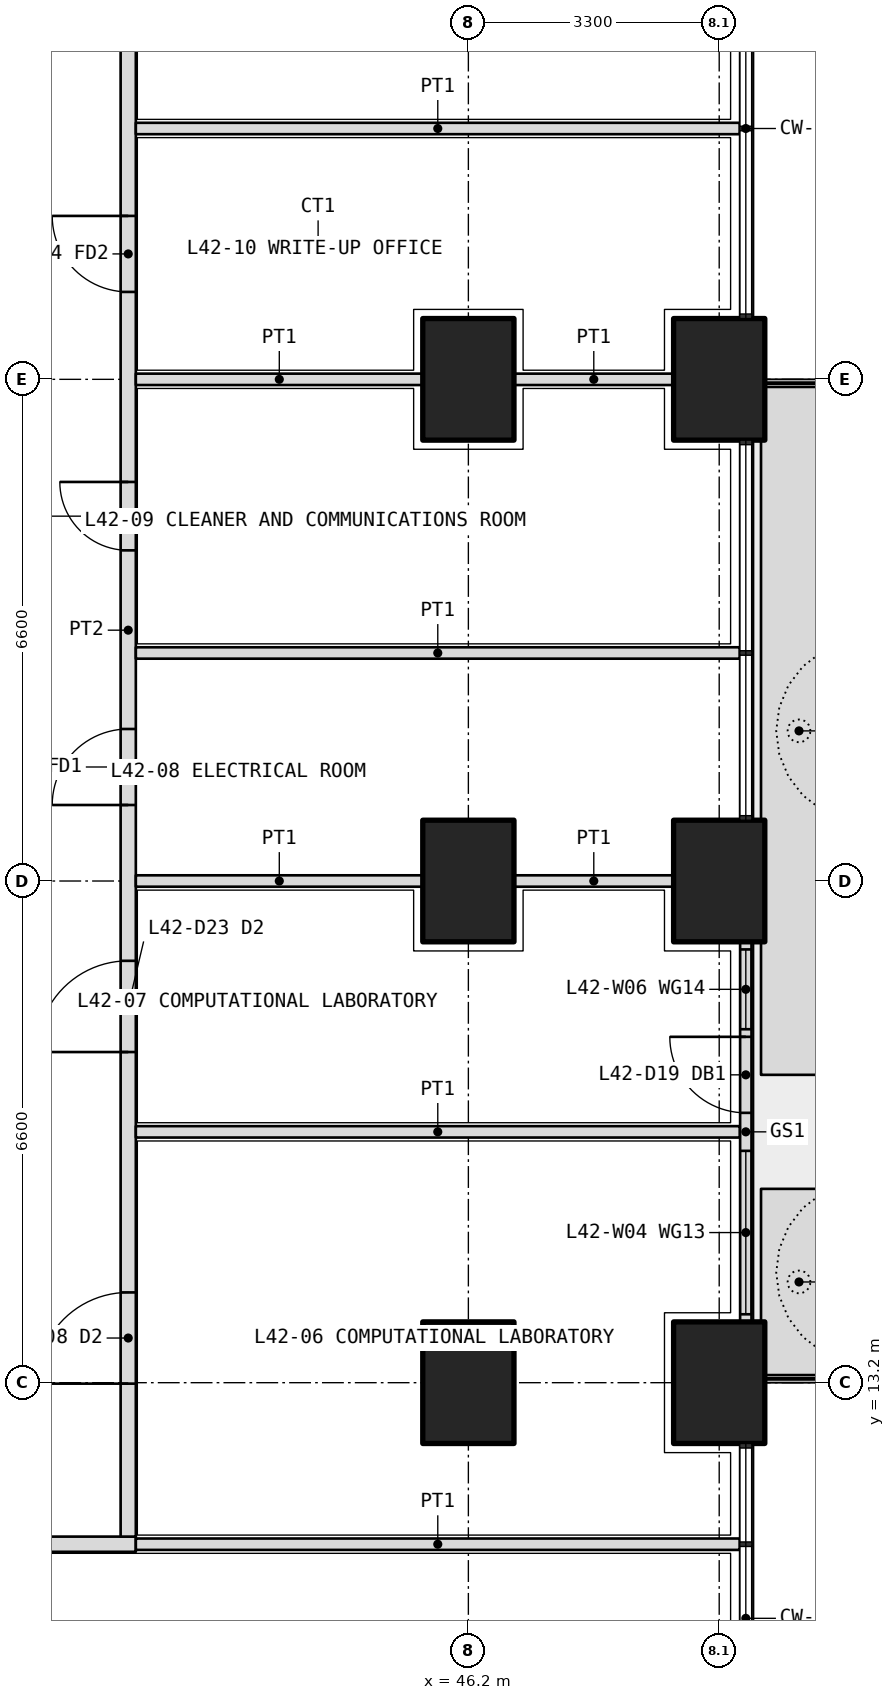
"""IFC4 building model, lengths in metres.
Left out: names, types, materials, properties, quantities, classifications, styles, units other than length and angle.
Written with IfcOpenShell. Run it as: python <this file> out.ifc"""

import sys

from ifc_helpers import new_model, si_unit, direction, frame, frame_2d, origin, origin_2d, place, context, subcontext, project, spatial, polyline, rectangle, outline, extrude, element, fill, save


model = new_model("IFC4")
c1 = context("Model", 3, precision=1e-05, world=origin(), true_north=direction((0.0, 1.0)))
c2 = subcontext(c1, "Body", "Model", "MODEL_VIEW")
j1 = project(units=[si_unit("LENGTHUNIT", "METRE"), si_unit("PLANEANGLEUNIT", "RADIAN")], contexts=[c1])
p1 = place(None, origin())
s1 = spatial("IfcSite", under=j1, at=p1, CompositionType="ELEMENT")
p2 = place(p1, origin())
s2 = spatial("IfcBuilding", under=s1, at=p2, CompositionType="ELEMENT")
p3 = place(p2, frame((0.0, 0.0, 185.1)))
s3 = spatial("IfcBuildingStorey", under=s2, at=p3, CompositionType="ELEMENT", Elevation=185.1)
for number, where, z_axis, x_axis in (
    (1, (49.5, 13.2, 0.0), (0.0, 0.0, 1.0), (0.0, 1.0, 0.0)),
    (2, (49.5, 19.8, 0.0), (0.0, 0.0, 1.0), (0.0, 1.0, 0.0)),
    (3, (49.5, 26.4, 0.0), (0.0, 0.0, 1.0), (0.0, 1.0, 0.0)),
    (4, (46.2, 13.2, 0.0), (0.0, 0.0, 1.0), (0.0, 1.0, 0.0)),
    (5, (46.2, 19.8, 0.0), (0.0, 0.0, 1.0), (0.0, 1.0, 0.0)),
    (6, (46.2, 26.4, 0.0), (0.0, 0.0, 1.0), (0.0, 1.0, 0.0)),
):
    element("IfcColumn", number, at=place(p3, frame(where, z_axis=z_axis, x_axis=x_axis)), inside=s3, PredefinedType="COLUMN", context=c2, shape_type="SweptSolid", body=[
        extrude(rectangle(XDim=1.6, YDim=1.2, at=origin_2d()), origin(), (0.0, 0.0, 1.0), 4.2),
    ])
p4 = place(p3, origin())
e7 = element("IfcWall", 7, at=p4, inside=s3, PredefinedType="USERDEFINED", context=c2, shape_type="SweptSolid", body=[
    extrude(outline(polyline([(50.05, 13.3), (51.05, 13.3), (51.05, 15.75), (50.05, 15.75), (50.05, 13.3)]), holes=[polyline([(50.2, 13.45), (50.9, 13.45), (50.9, 15.6), (50.2, 15.6), (50.2, 13.45)])]), origin(), (0.0, 0.0, 1.0), 1.05),
])
p5 = place(p3, origin())
e8 = element("IfcWall", 8, at=p5, inside=s3, PredefinedType="USERDEFINED", context=c2, shape_type="SweptSolid", body=[
    extrude(outline(polyline([(50.05, 17.25), (51.05, 17.25), (51.05, 26.3), (50.05, 26.3), (50.05, 17.25)]), holes=[polyline([(50.2, 17.4), (50.9, 17.4), (50.9, 26.15), (50.2, 26.15), (50.2, 17.4)])]), origin(), (0.0, 0.0, 1.0), 1.05),
])
p6 = place(p3, frame((49.85, 14.0, 0.0), z_axis=(0.0, 0.0, 1.0), x_axis=(0.0, 1.0, 0.0)))
e9 = element("IfcWall", 9, at=p6, inside=s3, PredefinedType="SOLIDWALL", context=c2, shape_type="SweptSolid", body=[
    extrude(rectangle(XDim=5.0, YDim=0.15, at=frame_2d((2.5, 0.0))), origin(), (0.0, 0.0, 1.0), 2.7),
])
p7 = place(p6, frame((2.75, 0.0, 0.0)))
e10 = element("IfcOpeningElement", 10, at=p7, cuts=e9, PredefinedType="OPENING", context=c2, shape_type="SweptSolid", body=[
    extrude(rectangle(XDim=1.0, YDim=2.4, at=frame_2d((0.5, 1.2))), frame((0.0, 0.085, 0.0), z_axis=(0.0, -1.0, 0.0), x_axis=(1.0, 0.0, 0.0)), (0.0, 0.0, 1.0), 0.17),
])
p8 = place(p6, frame((0.1, 0.0, 0.1)))
e11 = element("IfcOpeningElement", 11, at=p8, cuts=e9, PredefinedType="OPENING", context=c2, shape_type="SweptSolid", body=[
    extrude(rectangle(XDim=2.15, YDim=2.3, at=frame_2d((1.075, 1.15))), frame((0.0, 0.085, 0.0), z_axis=(0.0, -1.0, 0.0), x_axis=(1.0, 0.0, 0.0)), (0.0, 0.0, 1.0), 0.17),
])
p9 = place(p6, frame((3.85, 0.0, 0.1)))
e12 = element("IfcOpeningElement", 12, at=p9, cuts=e9, PredefinedType="OPENING", context=c2, shape_type="SweptSolid", body=[
    extrude(rectangle(XDim=1.05, YDim=2.3, at=frame_2d((0.525, 1.15))), frame((0.0, 0.085, 0.0), z_axis=(0.0, -1.0, 0.0), x_axis=(1.0, 0.0, 0.0)), (0.0, 0.0, 1.0), 0.17),
])
p10 = place(p3, frame((10.975, 11.075, 0.0), z_axis=(0.0, 0.0, 1.0), x_axis=(1.0, 0.0, 0.0)))
e13 = element("IfcWall", 13, at=p10, inside=s3, PredefinedType="PARTITIONING", context=c2, shape_type="SweptSolid", body=[
    extrude(rectangle(XDim=30.85, YDim=0.2, at=frame_2d((15.425, 0.0))), origin(), (0.0, 0.0, 1.0), 2.85),
])
p11 = place(p10, frame((3.863, 0.0, 0.0)))
e14 = element("IfcOpeningElement", 14, at=p11, cuts=e13, PredefinedType="OPENING", context=c2, shape_type="SweptSolid", body=[
    extrude(rectangle(XDim=1.2, YDim=2.1, at=frame_2d((0.6, 1.05))), frame((0.0, 0.11, 0.0), z_axis=(0.0, -1.0, 0.0), x_axis=(1.0, 0.0, 0.0)), (0.0, 0.0, 1.0), 0.22),
])
p12 = place(p10, frame((11.525, 0.0, 0.0)))
e15 = element("IfcOpeningElement", 15, at=p12, cuts=e13, PredefinedType="OPENING", context=c2, shape_type="SweptSolid", body=[
    extrude(rectangle(XDim=1.2, YDim=2.1, at=frame_2d((0.6, 1.05))), frame((0.0, 0.11, 0.0), z_axis=(0.0, -1.0, 0.0), x_axis=(1.0, 0.0, 0.0)), (0.0, 0.0, 1.0), 0.22),
])
p13 = place(p10, frame((18.125, 0.0, 0.0)))
e16 = element("IfcOpeningElement", 16, at=p13, cuts=e13, PredefinedType="OPENING", context=c2, shape_type="SweptSolid", body=[
    extrude(rectangle(XDim=1.2, YDim=2.1, at=frame_2d((0.6, 1.05))), frame((0.0, 0.11, 0.0), z_axis=(0.0, -1.0, 0.0), x_axis=(1.0, 0.0, 0.0)), (0.0, 0.0, 1.0), 0.22),
])
p14 = place(p10, frame((23.075, 0.0, 0.0)))
e17 = element("IfcOpeningElement", 17, at=p14, cuts=e13, PredefinedType="OPENING", context=c2, shape_type="SweptSolid", body=[
    extrude(rectangle(XDim=1.2, YDim=2.1, at=frame_2d((0.6, 1.05))), frame((0.0, 0.11, 0.0), z_axis=(0.0, -1.0, 0.0), x_axis=(1.0, 0.0, 0.0)), (0.0, 0.0, 1.0), 0.22),
])
p15 = place(p10, frame((27.438, 0.0, 0.0)))
e18 = element("IfcOpeningElement", 18, at=p15, cuts=e13, PredefinedType="OPENING", context=c2, shape_type="SweptSolid", body=[
    extrude(rectangle(XDim=1.2, YDim=2.1, at=frame_2d((0.6, 1.05))), frame((0.0, 0.11, 0.0), z_axis=(0.0, -1.0, 0.0), x_axis=(1.0, 0.0, 0.0)), (0.0, 0.0, 1.0), 0.22),
])
p16 = place(p3, frame((41.725, 11.175, 0.0), z_axis=(0.0, 0.0, 1.0), x_axis=(0.0, 1.0, 0.0)))
e19 = element("IfcWall", 19, at=p16, inside=s3, PredefinedType="PARTITIONING", context=c2, shape_type="SweptSolid", body=[
    extrude(rectangle(XDim=23.85, YDim=0.2, at=frame_2d((11.925, 0.0))), origin(), (0.0, 0.0, 1.0), 2.85),
])
p17 = place(p16, frame((2.012, 0.0, 0.0)))
e20 = element("IfcOpeningElement", 20, at=p17, cuts=e19, PredefinedType="OPENING", context=c2, shape_type="SweptSolid", body=[
    extrude(rectangle(XDim=1.2, YDim=2.1, at=frame_2d((0.6, 1.05))), frame((0.0, 0.11, 0.0), z_axis=(0.0, -1.0, 0.0), x_axis=(1.0, 0.0, 0.0)), (0.0, 0.0, 1.0), 0.22),
])
p18 = place(p16, frame((6.375, 0.0, 0.0)))
e21 = element("IfcOpeningElement", 21, at=p18, cuts=e19, PredefinedType="OPENING", context=c2, shape_type="SweptSolid", body=[
    extrude(rectangle(XDim=1.2, YDim=2.1, at=frame_2d((0.6, 1.05))), frame((0.0, 0.11, 0.0), z_axis=(0.0, -1.0, 0.0), x_axis=(1.0, 0.0, 0.0)), (0.0, 0.0, 1.0), 0.22),
])
p19 = place(p16, frame((9.625, 0.0, 0.0)))
e22 = element("IfcOpeningElement", 22, at=p19, cuts=e19, PredefinedType="OPENING", context=c2, shape_type="SweptSolid", body=[
    extrude(rectangle(XDim=1.0, YDim=2.1, at=frame_2d((0.5, 1.05))), frame((0.0, 0.11, 0.0), z_axis=(0.0, -1.0, 0.0), x_axis=(1.0, 0.0, 0.0)), (0.0, 0.0, 1.0), 0.22),
])
p20 = place(p16, frame((12.975, 0.0, 0.0)))
e23 = element("IfcOpeningElement", 23, at=p20, cuts=e19, PredefinedType="OPENING", context=c2, shape_type="SweptSolid", body=[
    extrude(rectangle(XDim=0.9, YDim=2.1, at=frame_2d((0.45, 1.05))), frame((0.0, 0.11, 0.0), z_axis=(0.0, -1.0, 0.0), x_axis=(1.0, 0.0, 0.0)), (0.0, 0.0, 1.0), 0.22),
])
p21 = place(p16, frame((16.375, 0.0, 0.0)))
e24 = element("IfcOpeningElement", 24, at=p21, cuts=e19, PredefinedType="OPENING", context=c2, shape_type="SweptSolid", body=[
    extrude(rectangle(XDim=1.0, YDim=2.1, at=frame_2d((0.5, 1.05))), frame((0.0, 0.11, 0.0), z_axis=(0.0, -1.0, 0.0), x_axis=(1.0, 0.0, 0.0)), (0.0, 0.0, 1.0), 0.22),
])
p22 = place(p16, frame((20.637, 0.0, 0.0)))
e25 = element("IfcOpeningElement", 25, at=p22, cuts=e19, PredefinedType="OPENING", context=c2, shape_type="SweptSolid", body=[
    extrude(rectangle(XDim=1.2, YDim=2.1, at=frame_2d((0.6, 1.05))), frame((0.0, 0.11, 0.0), z_axis=(0.0, -1.0, 0.0), x_axis=(1.0, 0.0, 0.0)), (0.0, 0.0, 1.0), 0.22),
])
for number, where, z_axis, x_axis in (
    (26, (49.77, 11.075, 0.0), (0.0, 0.0, 1.0), (-1.0, 0.0, 0.0)),
    (27, (49.77, 22.8, 0.0), (0.0, 0.0, 1.0), (-1.0, 0.0, 0.0)),
):
    element("IfcWall", number, at=place(p3, frame(where, z_axis=z_axis, x_axis=x_axis)), inside=s3, PredefinedType="PARTITIONING", context=c2, shape_type="SweptSolid", body=[
        extrude(rectangle(XDim=7.945, YDim=0.15, at=frame_2d((3.973, 0.0))), origin(), (0.0, 0.0, 1.0), 2.7),
    ])
p23 = place(p3, frame((48.9, 26.4, 0.0), z_axis=(0.0, 0.0, 1.0), x_axis=(-1.0, 0.0, 0.0)))
e28 = element("IfcWall", 28, at=p23, inside=s3, PredefinedType="PARTITIONING", context=c2, shape_type="SweptSolid", body=[
    extrude(rectangle(XDim=2.1, YDim=0.15, at=frame_2d((1.05, 0.0))), origin(), (0.0, 0.0, 1.0), 2.85),
])
p24 = place(p3, frame((45.6, 26.4, 0.0), z_axis=(0.0, 0.0, 1.0), x_axis=(-1.0, 0.0, 0.0)))
e29 = element("IfcWall", 29, at=p24, inside=s3, PredefinedType="PARTITIONING", context=c2, shape_type="SweptSolid", body=[
    extrude(rectangle(XDim=3.775, YDim=0.15, at=frame_2d((1.888, 0.0))), origin(), (0.0, 0.0, 1.0), 2.85),
])
p25 = place(p3, frame((49.77, 16.5, 0.0), z_axis=(0.0, 0.0, 1.0), x_axis=(-1.0, 0.0, 0.0)))
e30 = element("IfcWall", 30, at=p25, inside=s3, PredefinedType="PARTITIONING", context=c2, shape_type="SweptSolid", body=[
    extrude(rectangle(XDim=7.945, YDim=0.15, at=frame_2d((3.973, 0.0))), origin(), (0.0, 0.0, 1.0), 2.7),
])
p26 = place(p3, frame((48.9, 19.8, 0.0), z_axis=(0.0, 0.0, 1.0), x_axis=(-1.0, 0.0, 0.0)))
e31 = element("IfcWall", 31, at=p26, inside=s3, PredefinedType="PARTITIONING", context=c2, shape_type="SweptSolid", body=[
    extrude(rectangle(XDim=2.1, YDim=0.15, at=frame_2d((1.05, 0.0))), origin(), (0.0, 0.0, 1.0), 2.85),
])
p27 = place(p3, frame((45.6, 19.8, 0.0), z_axis=(0.0, 0.0, 1.0), x_axis=(-1.0, 0.0, 0.0)))
e32 = element("IfcWall", 32, at=p27, inside=s3, PredefinedType="PARTITIONING", context=c2, shape_type="SweptSolid", body=[
    extrude(rectangle(XDim=3.775, YDim=0.15, at=frame_2d((1.888, 0.0))), origin(), (0.0, 0.0, 1.0), 2.85),
])
p28 = place(p3, frame((49.77, 29.7, 0.0), z_axis=(0.0, 0.0, 1.0), x_axis=(-1.0, 0.0, 0.0)))
e33 = element("IfcWall", 33, at=p28, inside=s3, PredefinedType="PARTITIONING", context=c2, shape_type="SweptSolid", body=[
    extrude(rectangle(XDim=7.945, YDim=0.15, at=frame_2d((3.973, 0.0))), origin(), (0.0, 0.0, 1.0), 2.7),
])
p29 = place(p7, origin())
e34 = element("IfcDoor", 34, at=p29, inside=s3, OperationType="SINGLE_SWING_RIGHT", PredefinedType="DOOR", context=c2, shape_type="SweptSolid", body=[
    extrude(rectangle(XDim=1.0, YDim=2.4, at=frame_2d((0.5, 1.2))), frame((0.0, 0.025, 0.0), z_axis=(0.0, -1.0, 0.0), x_axis=(1.0, 0.0, 0.0)), (0.0, 0.0, 1.0), 0.05),
])
fill(e10, e34)
p30 = place(p8, origin())
e35 = element("IfcWindow", 35, at=p30, inside=s3, PartitioningType="SINGLE_PANEL", PredefinedType="WINDOW", context=c2, shape_type="SweptSolid", body=[
    extrude(rectangle(XDim=2.15, YDim=2.3, at=frame_2d((1.075, 1.15))), frame((0.0, 0.03, 0.0), z_axis=(0.0, -1.0, 0.0), x_axis=(1.0, 0.0, 0.0)), (0.0, 0.0, 1.0), 0.06),
])
fill(e11, e35)
p31 = place(p9, origin())
e36 = element("IfcWindow", 36, at=p31, inside=s3, PartitioningType="SINGLE_PANEL", PredefinedType="WINDOW", context=c2, shape_type="SweptSolid", body=[
    extrude(rectangle(XDim=1.05, YDim=2.3, at=frame_2d((0.525, 1.15))), frame((0.0, 0.03, 0.0), z_axis=(0.0, -1.0, 0.0), x_axis=(1.0, 0.0, 0.0)), (0.0, 0.0, 1.0), 0.06),
])
fill(e12, e36)
p32 = place(p17, origin())
e37 = element("IfcDoor", 37, at=p32, inside=s3, OperationType="DOUBLE_DOOR_SINGLE_SWING", PredefinedType="DOOR", context=c2, shape_type="SweptSolid", body=[
    extrude(rectangle(XDim=1.2, YDim=2.1, at=frame_2d((0.6, 1.05))), frame((0.0, 0.025, 0.0), z_axis=(0.0, -1.0, 0.0), x_axis=(1.0, 0.0, 0.0)), (0.0, 0.0, 1.0), 0.05),
])
fill(e20, e37)
p33 = place(p18, origin())
e38 = element("IfcDoor", 38, at=p33, inside=s3, OperationType="DOUBLE_DOOR_SINGLE_SWING", PredefinedType="DOOR", context=c2, shape_type="SweptSolid", body=[
    extrude(rectangle(XDim=1.2, YDim=2.1, at=frame_2d((0.6, 1.05))), frame((0.0, 0.025, 0.0), z_axis=(0.0, -1.0, 0.0), x_axis=(1.0, 0.0, 0.0)), (0.0, 0.0, 1.0), 0.05),
])
fill(e21, e38)
p34 = place(p19, origin())
e39 = element("IfcDoor", 39, at=p34, inside=s3, OperationType="SINGLE_SWING_LEFT", PredefinedType="DOOR", context=c2, shape_type="SweptSolid", body=[
    extrude(rectangle(XDim=1.0, YDim=2.1, at=frame_2d((0.5, 1.05))), frame((0.0, 0.025, 0.0), z_axis=(0.0, -1.0, 0.0), x_axis=(1.0, 0.0, 0.0)), (0.0, 0.0, 1.0), 0.05),
])
fill(e22, e39)
p35 = place(p20, origin())
e40 = element("IfcDoor", 40, at=p35, inside=s3, OperationType="SINGLE_SWING_RIGHT", PredefinedType="DOOR", context=c2, shape_type="SweptSolid", body=[
    extrude(rectangle(XDim=0.9, YDim=2.1, at=frame_2d((0.45, 1.05))), frame((0.0, 0.025, 0.0), z_axis=(0.0, -1.0, 0.0), x_axis=(1.0, 0.0, 0.0)), (0.0, 0.0, 1.0), 0.05),
])
fill(e23, e40)
p36 = place(p21, origin())
e41 = element("IfcDoor", 41, at=p36, inside=s3, OperationType="SINGLE_SWING_RIGHT", PredefinedType="DOOR", context=c2, shape_type="SweptSolid", body=[
    extrude(rectangle(XDim=1.0, YDim=2.1, at=frame_2d((0.5, 1.05))), frame((0.0, 0.025, 0.0), z_axis=(0.0, -1.0, 0.0), x_axis=(1.0, 0.0, 0.0)), (0.0, 0.0, 1.0), 0.05),
])
fill(e24, e41)
save(model, sys.argv[1])
